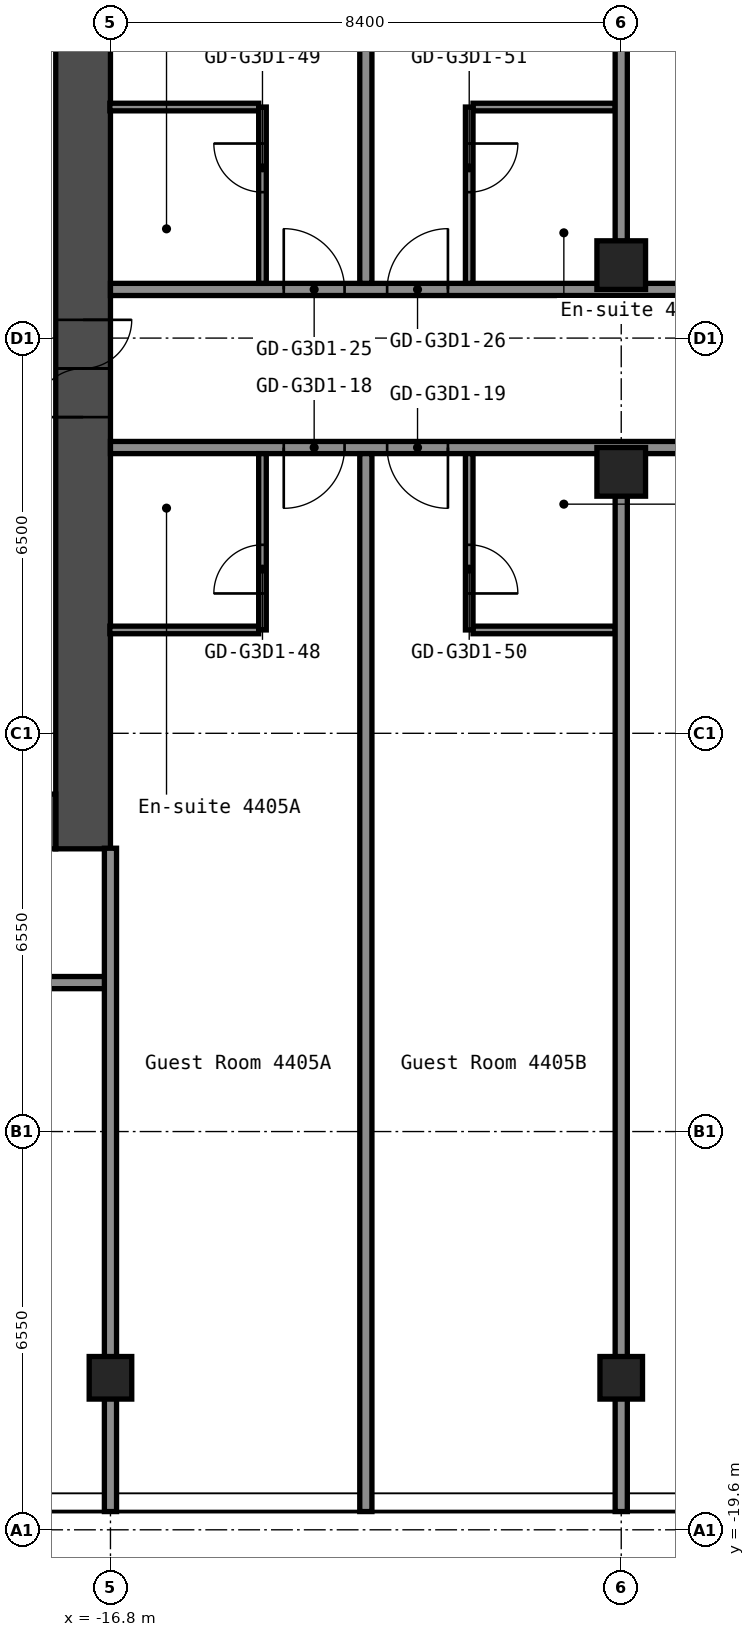
"""IFC4 building model, lengths in metres.
Left out: names, types, materials, properties, quantities, classifications, styles, units other than length and angle.
Written with IfcOpenShell. Run it as: python <this file> out.ifc"""

import sys

from ifc_helpers import new_model, si_unit, direction, frame, frame_2d, origin, origin_2d, place, context, subcontext, project, spatial, rectangle, hollow_rectangle, extrude, element, fill, save


model = new_model("IFC4")
c1 = context("Model", 3, precision=1e-05, world=origin(), true_north=direction((0.0, 1.0)))
c2 = subcontext(c1, "Body", "Model", "MODEL_VIEW")
j1 = project(units=[si_unit("LENGTHUNIT", "METRE"), si_unit("PLANEANGLEUNIT", "RADIAN")], contexts=[c1])
p1 = place(None, origin())
s1 = spatial("IfcSite", under=j1, at=p1, CompositionType="ELEMENT")
p2 = place(p1, origin())
s2 = spatial("IfcBuilding", under=s1, at=p2, CompositionType="ELEMENT")
p3 = place(p2, frame((0.0, 0.0, 156.6)))
s3 = spatial("IfcBuildingStorey", under=s2, at=p3, CompositionType="ELEMENT", Elevation=156.6)
for number, where, z_axis, x_axis in (
    (1, (-16.8, -17.1, 0.0), (0.0, 0.0, 1.0), (1.0, 0.0, 0.0)),
    (2, (-8.4, -17.1, 0.0), (0.0, 0.0, 1.0), (1.0, 0.0, 0.0)),
):
    element("IfcColumn", number, at=place(p3, frame(where, z_axis=z_axis, x_axis=x_axis)), inside=s3, PredefinedType="COLUMN", context=c2, shape_type="SweptSolid", body=[
        extrude(hollow_rectangle(XDim=0.7, YDim=0.7, WallThickness=0.028, at=origin_2d()), origin(), (0.0, 0.0, 1.0), 2.75),
    ])
for number, where, z_axis, x_axis in (
    (3, (-8.4, -2.2, 0.0), (0.0, 0.0, 1.0), (1.0, 0.0, 0.0)),
    (4, (-8.4, 1.2, 0.0), (0.0, 0.0, 1.0), (1.0, 0.0, 0.0)),
):
    element("IfcColumn", number, at=place(p3, frame(where, z_axis=z_axis, x_axis=x_axis)), inside=s3, PredefinedType="COLUMN", context=c2, shape_type="SweptSolid", body=[
        extrude(hollow_rectangle(XDim=0.8, YDim=0.8, WallThickness=0.032, at=origin_2d()), origin(), (0.0, 0.0, 1.0), 2.75),
    ])
p4 = place(p3, frame((-17.25, -8.4, 0.0), z_axis=(0.0, 0.0, 1.0), x_axis=(0.0, 1.0, 0.0)))
e5 = element("IfcWall", 5, at=p4, inside=s3, PredefinedType="SHEAR", context=c2, shape_type="SweptSolid", body=[
    extrude(rectangle(XDim=16.8, YDim=0.9, at=frame_2d((8.4, 0.0))), origin(), (0.0, 0.0, 1.0), 2.75),
])
p5 = place(p4, frame((7.1, 0.0, 0.0)))
e6 = element("IfcOpeningElement", 6, at=p5, cuts=e5, PredefinedType="OPENING", context=c2, shape_type="SweptSolid", body=[
    extrude(rectangle(XDim=1.6, YDim=2.1, at=frame_2d((0.8, 1.05))), frame((0.0, 0.46, 0.0), z_axis=(0.0, -1.0, 0.0), x_axis=(1.0, 0.0, 0.0)), (0.0, 0.0, 1.0), 0.92),
])
p6 = place(p3, frame((-32.7, -7.95, 0.0), z_axis=(0.0, 0.0, 1.0), x_axis=(1.0, 0.0, 0.0)))
e7 = element("IfcWall", 7, at=p6, inside=s3, PredefinedType="SHEAR", context=c2, shape_type="SweptSolid", body=[
    extrude(rectangle(XDim=15.0, YDim=0.9, at=frame_2d((7.5, 0.0))), origin(), (0.0, 0.0, 1.0), 2.75),
])
p7 = place(p6, frame((11.45, 0.0, 0.0)))
e8 = element("IfcOpeningElement", 8, at=p7, cuts=e7, PredefinedType="OPENING", context=c2, shape_type="SweptSolid", body=[
    extrude(rectangle(XDim=1.0, YDim=2.1, at=frame_2d((0.5, 1.05))), frame((0.0, 0.46, 0.0), z_axis=(0.0, -1.0, 0.0), x_axis=(1.0, 0.0, 0.0)), (0.0, 0.0, 1.0), 0.92),
])
p8 = place(p3, frame((-42.7, -10.6, 0.0), z_axis=(0.0, 0.0, 1.0), x_axis=(1.0, 0.0, 0.0)))
e9 = element("IfcWall", 9, at=p8, inside=s3, PredefinedType="PARTITIONING", context=c2, shape_type="SweptSolid", body=[
    extrude(rectangle(XDim=25.9, YDim=0.2, at=frame_2d((12.95, 0.0))), origin(), (0.0, 0.0, 1.0), 2.75),
])
p9 = place(p8, frame((2.5, 0.0, 0.0)))
e10 = element("IfcOpeningElement", 10, at=p9, cuts=e9, PredefinedType="OPENING", context=c2, shape_type="SweptSolid", body=[
    extrude(rectangle(XDim=1.0, YDim=2.1, at=frame_2d((0.5, 1.05))), frame((0.0, 0.11, 0.0), z_axis=(0.0, -1.0, 0.0), x_axis=(1.0, 0.0, 0.0)), (0.0, 0.0, 1.0), 0.22),
])
p10 = place(p8, frame((11.95, 0.0, 0.0)))
e11 = element("IfcOpeningElement", 11, at=p10, cuts=e9, PredefinedType="OPENING", context=c2, shape_type="SweptSolid", body=[
    extrude(rectangle(XDim=1.0, YDim=2.1, at=frame_2d((0.5, 1.05))), frame((0.0, 0.11, 0.0), z_axis=(0.0, -1.0, 0.0), x_axis=(1.0, 0.0, 0.0)), (0.0, 0.0, 1.0), 0.22),
])
p11 = place(p8, frame((13.65, 0.0, 0.0)))
e12 = element("IfcOpeningElement", 12, at=p11, cuts=e9, PredefinedType="OPENING", context=c2, shape_type="SweptSolid", body=[
    extrude(rectangle(XDim=1.0, YDim=2.1, at=frame_2d((0.5, 1.05))), frame((0.0, 0.11, 0.0), z_axis=(0.0, -1.0, 0.0), x_axis=(1.0, 0.0, 0.0)), (0.0, 0.0, 1.0), 0.22),
])
p12 = place(p8, frame((22.9, 0.0, 0.0)))
e13 = element("IfcOpeningElement", 13, at=p12, cuts=e9, PredefinedType="OPENING", context=c2, shape_type="SweptSolid", body=[
    extrude(rectangle(XDim=1.0, YDim=2.1, at=frame_2d((0.5, 1.05))), frame((0.0, 0.11, 0.0), z_axis=(0.0, -1.0, 0.0), x_axis=(1.0, 0.0, 0.0)), (0.0, 0.0, 1.0), 0.22),
])
p13 = place(p3, frame((-16.81, -4.8, 0.0), z_axis=(0.0, 0.0, 1.0), x_axis=(1.0, 0.0, 0.0)))
e14 = element("IfcWall", 14, at=p13, inside=s3, PredefinedType="PARTITIONING", context=c2, shape_type="SweptSolid", body=[
    extrude(rectangle(XDim=2.448, YDim=0.125, at=frame_2d((1.224, 0.0))), origin(), (0.0, 0.0, 1.0), 2.75),
])
p14 = place(p3, frame((-10.837, -4.8, 0.0), z_axis=(0.0, 0.0, 1.0), x_axis=(1.0, 0.0, 0.0)))
e15 = element("IfcWall", 15, at=p14, inside=s3, PredefinedType="PARTITIONING", context=c2, shape_type="SweptSolid", body=[
    extrude(rectangle(XDim=2.337, YDim=0.125, at=frame_2d((1.169, 0.0))), origin(), (0.0, 0.0, 1.0), 2.75),
])
p15 = place(p3, frame((-16.8, -1.8, 0.0), z_axis=(0.0, 0.0, 1.0), x_axis=(1.0, 0.0, 0.0)))
e16 = element("IfcWall", 16, at=p15, inside=s3, PredefinedType="PARTITIONING", context=c2, shape_type="SweptSolid", body=[
    extrude(rectangle(XDim=33.6, YDim=0.2, at=frame_2d((16.8, 0.0))), origin(), (0.0, 0.0, 1.0), 2.75),
])
p16 = place(p15, frame((2.85, 0.0, 0.0)))
e17 = element("IfcOpeningElement", 17, at=p16, cuts=e16, PredefinedType="OPENING", context=c2, shape_type="SweptSolid", body=[
    extrude(rectangle(XDim=1.0, YDim=2.1, at=frame_2d((0.5, 1.05))), frame((0.0, 0.11, 0.0), z_axis=(0.0, -1.0, 0.0), x_axis=(1.0, 0.0, 0.0)), (0.0, 0.0, 1.0), 0.22),
])
p17 = place(p15, frame((4.55, 0.0, 0.0)))
e18 = element("IfcOpeningElement", 18, at=p17, cuts=e16, PredefinedType="OPENING", context=c2, shape_type="SweptSolid", body=[
    extrude(rectangle(XDim=1.0, YDim=2.1, at=frame_2d((0.5, 1.05))), frame((0.0, 0.11, 0.0), z_axis=(0.0, -1.0, 0.0), x_axis=(1.0, 0.0, 0.0)), (0.0, 0.0, 1.0), 0.22),
])
p18 = place(p15, frame((10.385, 0.0, 0.0)))
e19 = element("IfcOpeningElement", 19, at=p18, cuts=e16, PredefinedType="OPENING", context=c2, shape_type="SweptSolid", body=[
    extrude(rectangle(XDim=0.9, YDim=2.1, at=frame_2d((0.45, 1.05))), frame((0.0, 0.11, 0.0), z_axis=(0.0, -1.0, 0.0), x_axis=(1.0, 0.0, 0.0)), (0.0, 0.0, 1.0), 0.22),
])
p19 = place(p15, frame((14.585, 0.0, 0.0)))
e20 = element("IfcOpeningElement", 20, at=p19, cuts=e16, PredefinedType="OPENING", context=c2, shape_type="SweptSolid", body=[
    extrude(rectangle(XDim=0.9, YDim=2.1, at=frame_2d((0.45, 1.05))), frame((0.0, 0.11, 0.0), z_axis=(0.0, -1.0, 0.0), x_axis=(1.0, 0.0, 0.0)), (0.0, 0.0, 1.0), 0.22),
])
p20 = place(p15, frame((19.65, 0.0, 0.0)))
e21 = element("IfcOpeningElement", 21, at=p20, cuts=e16, PredefinedType="OPENING", context=c2, shape_type="SweptSolid", body=[
    extrude(rectangle(XDim=1.0, YDim=2.1, at=frame_2d((0.5, 1.05))), frame((0.0, 0.11, 0.0), z_axis=(0.0, -1.0, 0.0), x_axis=(1.0, 0.0, 0.0)), (0.0, 0.0, 1.0), 0.22),
])
p21 = place(p15, frame((21.35, 0.0, 0.0)))
e22 = element("IfcOpeningElement", 22, at=p21, cuts=e16, PredefinedType="OPENING", context=c2, shape_type="SweptSolid", body=[
    extrude(rectangle(XDim=1.0, YDim=2.1, at=frame_2d((0.5, 1.05))), frame((0.0, 0.11, 0.0), z_axis=(0.0, -1.0, 0.0), x_axis=(1.0, 0.0, 0.0)), (0.0, 0.0, 1.0), 0.22),
])
p22 = place(p15, frame((30.6, 0.0, 0.0)))
e23 = element("IfcOpeningElement", 23, at=p22, cuts=e16, PredefinedType="OPENING", context=c2, shape_type="SweptSolid", body=[
    extrude(rectangle(XDim=1.0, YDim=2.1, at=frame_2d((0.5, 1.05))), frame((0.0, 0.11, 0.0), z_axis=(0.0, -1.0, 0.0), x_axis=(1.0, 0.0, 0.0)), (0.0, 0.0, 1.0), 0.22),
])
p23 = place(p3, frame((-16.8, 0.8, 0.0), z_axis=(0.0, 0.0, 1.0), x_axis=(1.0, 0.0, 0.0)))
e24 = element("IfcWall", 24, at=p23, inside=s3, PredefinedType="PARTITIONING", context=c2, shape_type="SweptSolid", body=[
    extrude(rectangle(XDim=33.6, YDim=0.2, at=frame_2d((16.8, 0.0))), origin(), (0.0, 0.0, 1.0), 2.75),
])
p24 = place(p23, frame((2.85, 0.0, 0.0)))
e25 = element("IfcOpeningElement", 25, at=p24, cuts=e24, PredefinedType="OPENING", context=c2, shape_type="SweptSolid", body=[
    extrude(rectangle(XDim=1.0, YDim=2.1, at=frame_2d((0.5, 1.05))), frame((0.0, 0.11, 0.0), z_axis=(0.0, -1.0, 0.0), x_axis=(1.0, 0.0, 0.0)), (0.0, 0.0, 1.0), 0.22),
])
p25 = place(p23, frame((4.55, 0.0, 0.0)))
e26 = element("IfcOpeningElement", 26, at=p25, cuts=e24, PredefinedType="OPENING", context=c2, shape_type="SweptSolid", body=[
    extrude(rectangle(XDim=1.0, YDim=2.1, at=frame_2d((0.5, 1.05))), frame((0.0, 0.11, 0.0), z_axis=(0.0, -1.0, 0.0), x_axis=(1.0, 0.0, 0.0)), (0.0, 0.0, 1.0), 0.22),
])
p26 = place(p23, frame((10.4, 0.0, 0.0)))
e27 = element("IfcOpeningElement", 27, at=p26, cuts=e24, PredefinedType="OPENING", context=c2, shape_type="SweptSolid", body=[
    extrude(rectangle(XDim=1.0, YDim=2.1, at=frame_2d((0.5, 1.05))), frame((0.0, 0.11, 0.0), z_axis=(0.0, -1.0, 0.0), x_axis=(1.0, 0.0, 0.0)), (0.0, 0.0, 1.0), 0.22),
])
p27 = place(p23, frame((19.65, 0.0, 0.0)))
e28 = element("IfcOpeningElement", 28, at=p27, cuts=e24, PredefinedType="OPENING", context=c2, shape_type="SweptSolid", body=[
    extrude(rectangle(XDim=1.0, YDim=2.1, at=frame_2d((0.5, 1.05))), frame((0.0, 0.11, 0.0), z_axis=(0.0, -1.0, 0.0), x_axis=(1.0, 0.0, 0.0)), (0.0, 0.0, 1.0), 0.22),
])
p28 = place(p23, frame((21.35, 0.0, 0.0)))
e29 = element("IfcOpeningElement", 29, at=p28, cuts=e24, PredefinedType="OPENING", context=c2, shape_type="SweptSolid", body=[
    extrude(rectangle(XDim=1.0, YDim=2.1, at=frame_2d((0.5, 1.05))), frame((0.0, 0.11, 0.0), z_axis=(0.0, -1.0, 0.0), x_axis=(1.0, 0.0, 0.0)), (0.0, 0.0, 1.0), 0.22),
])
p29 = place(p23, frame((30.6, 0.0, 0.0)))
e30 = element("IfcOpeningElement", 30, at=p29, cuts=e24, PredefinedType="OPENING", context=c2, shape_type="SweptSolid", body=[
    extrude(rectangle(XDim=1.0, YDim=2.1, at=frame_2d((0.5, 1.05))), frame((0.0, 0.11, 0.0), z_axis=(0.0, -1.0, 0.0), x_axis=(1.0, 0.0, 0.0)), (0.0, 0.0, 1.0), 0.22),
])
p30 = place(p3, frame((-16.81, 3.8, 0.0), z_axis=(0.0, 0.0, 1.0), x_axis=(1.0, 0.0, 0.0)))
e31 = element("IfcWall", 31, at=p30, inside=s3, PredefinedType="PARTITIONING", context=c2, shape_type="SweptSolid", body=[
    extrude(rectangle(XDim=2.448, YDim=0.125, at=frame_2d((1.224, 0.0))), origin(), (0.0, 0.0, 1.0), 2.75),
])
p31 = place(p3, frame((-10.837, 3.8, 0.0), z_axis=(0.0, 0.0, 1.0), x_axis=(1.0, 0.0, 0.0)))
e32 = element("IfcWall", 32, at=p31, inside=s3, PredefinedType="PARTITIONING", context=c2, shape_type="SweptSolid", body=[
    extrude(rectangle(XDim=2.337, YDim=0.125, at=frame_2d((1.169, 0.0))), origin(), (0.0, 0.0, 1.0), 2.75),
])
p32 = place(p3, frame((-16.8, -19.3, 0.0), z_axis=(0.0, 0.0, 1.0), x_axis=(0.0, 1.0, 0.0)))
e33 = element("IfcWall", 33, at=p32, inside=s3, PredefinedType="PARTITIONING", context=c2, shape_type="SweptSolid", body=[
    extrude(rectangle(XDim=10.91, YDim=0.2, at=frame_2d((5.455, 0.0))), origin(), (0.0, 0.0, 1.0), 2.75),
])
p33 = place(p3, frame((-14.3, -4.8, 0.0), z_axis=(0.0, 0.0, 1.0), x_axis=(0.0, 1.0, 0.0)))
e34 = element("IfcWall", 34, at=p33, inside=s3, PredefinedType="PARTITIONING", context=c2, shape_type="SweptSolid", body=[
    extrude(rectangle(XDim=2.9, YDim=0.125, at=frame_2d((1.45, 0.0))), origin(), (0.0, 0.0, 1.0), 2.75),
])
p34 = place(p33, frame((0.6, 0.0, 0.0)))
e35 = element("IfcOpeningElement", 35, at=p34, cuts=e34, PredefinedType="OPENING", context=c2, shape_type="SweptSolid", body=[
    extrude(rectangle(XDim=0.8, YDim=2.1, at=frame_2d((0.4, 1.05))), frame((0.0, 0.073, 0.0), z_axis=(0.0, -1.0, 0.0), x_axis=(1.0, 0.0, 0.0)), (0.0, 0.0, 1.0), 0.145),
])
p35 = place(p3, frame((-14.3, 0.9, 0.0), z_axis=(0.0, 0.0, 1.0), x_axis=(0.0, 1.0, 0.0)))
e36 = element("IfcWall", 36, at=p35, inside=s3, PredefinedType="PARTITIONING", context=c2, shape_type="SweptSolid", body=[
    extrude(rectangle(XDim=2.9, YDim=0.125, at=frame_2d((1.45, 0.0))), origin(), (0.0, 0.0, 1.0), 2.75),
])
p36 = place(p35, frame((1.5, 0.0, 0.0)))
e37 = element("IfcOpeningElement", 37, at=p36, cuts=e36, PredefinedType="OPENING", context=c2, shape_type="SweptSolid", body=[
    extrude(rectangle(XDim=0.8, YDim=2.1, at=frame_2d((0.4, 1.05))), frame((0.0, 0.073, 0.0), z_axis=(0.0, -1.0, 0.0), x_axis=(1.0, 0.0, 0.0)), (0.0, 0.0, 1.0), 0.145),
])
for number, where, z_axis, x_axis in (
    (38, (-12.6, -19.3, 0.0), (0.0, 0.0, 1.0), (0.0, 1.0, 0.0)),
    (39, (-12.6, 0.9, 0.0), (0.0, 0.0, 1.0), (0.0, 1.0, 0.0)),
):
    element("IfcWall", number, at=place(p3, frame(where, z_axis=z_axis, x_axis=x_axis)), inside=s3, PredefinedType="PARTITIONING", context=c2, shape_type="SweptSolid", body=[
        extrude(rectangle(XDim=17.4, YDim=0.2, at=frame_2d((8.7, 0.0))), origin(), (0.0, 0.0, 1.0), 2.75),
    ])
p37 = place(p3, frame((-10.9, -4.8, 0.0), z_axis=(0.0, 0.0, 1.0), x_axis=(0.0, 1.0, 0.0)))
e40 = element("IfcWall", 40, at=p37, inside=s3, PredefinedType="PARTITIONING", context=c2, shape_type="SweptSolid", body=[
    extrude(rectangle(XDim=2.9, YDim=0.125, at=frame_2d((1.45, 0.0))), origin(), (0.0, 0.0, 1.0), 2.75),
])
p38 = place(p37, frame((0.6, 0.0, 0.0)))
e41 = element("IfcOpeningElement", 41, at=p38, cuts=e40, PredefinedType="OPENING", context=c2, shape_type="SweptSolid", body=[
    extrude(rectangle(XDim=0.8, YDim=2.1, at=frame_2d((0.4, 1.05))), frame((0.0, 0.073, 0.0), z_axis=(0.0, -1.0, 0.0), x_axis=(1.0, 0.0, 0.0)), (0.0, 0.0, 1.0), 0.145),
])
p39 = place(p3, frame((-10.9, 0.9, 0.0), z_axis=(0.0, 0.0, 1.0), x_axis=(0.0, 1.0, 0.0)))
e42 = element("IfcWall", 42, at=p39, inside=s3, PredefinedType="PARTITIONING", context=c2, shape_type="SweptSolid", body=[
    extrude(rectangle(XDim=2.9, YDim=0.125, at=frame_2d((1.45, 0.0))), origin(), (0.0, 0.0, 1.0), 2.75),
])
p40 = place(p39, frame((1.5, 0.0, 0.0)))
e43 = element("IfcOpeningElement", 43, at=p40, cuts=e42, PredefinedType="OPENING", context=c2, shape_type="SweptSolid", body=[
    extrude(rectangle(XDim=0.8, YDim=2.1, at=frame_2d((0.4, 1.05))), frame((0.0, 0.073, 0.0), z_axis=(0.0, -1.0, 0.0), x_axis=(1.0, 0.0, 0.0)), (0.0, 0.0, 1.0), 0.145),
])
for number, where, z_axis, x_axis in (
    (44, (-8.4, -19.3, 0.0), (0.0, 0.0, 1.0), (0.0, 1.0, 0.0)),
    (45, (-8.4, 1.59, 0.0), (0.0, 0.0, 1.0), (0.0, 1.0, 0.0)),
):
    element("IfcWall", number, at=place(p3, frame(where, z_axis=z_axis, x_axis=x_axis)), inside=s3, PredefinedType="PARTITIONING", context=c2, shape_type="SweptSolid", body=[
        extrude(rectangle(XDim=16.71, YDim=0.2, at=frame_2d((8.355, 0.0))), origin(), (0.0, 0.0, 1.0), 2.75),
    ])
p41 = place(p5, origin())
e46 = element("IfcDoor", 46, at=p41, inside=s3, OperationType="DOUBLE_DOOR_SINGLE_SWING", PredefinedType="DOOR", context=c2, shape_type="SweptSolid", body=[
    extrude(rectangle(XDim=1.6, YDim=2.1, at=frame_2d((0.8, 1.05))), frame((0.0, 0.025, 0.0), z_axis=(0.0, -1.0, 0.0), x_axis=(1.0, 0.0, 0.0)), (0.0, 0.0, 1.0), 0.05),
])
fill(e6, e46)
p42 = place(p16, origin())
e47 = element("IfcDoor", 47, at=p42, inside=s3, OperationType="SINGLE_SWING_LEFT", PredefinedType="DOOR", context=c2, shape_type="SweptSolid", body=[
    extrude(rectangle(XDim=1.0, YDim=2.1, at=frame_2d((0.5, 1.05))), frame((0.0, 0.025, 0.0), z_axis=(0.0, -1.0, 0.0), x_axis=(1.0, 0.0, 0.0)), (0.0, 0.0, 1.0), 0.05),
])
fill(e17, e47)
p43 = place(p17, origin())
e48 = element("IfcDoor", 48, at=p43, inside=s3, OperationType="SINGLE_SWING_RIGHT", PredefinedType="DOOR", context=c2, shape_type="SweptSolid", body=[
    extrude(rectangle(XDim=1.0, YDim=2.1, at=frame_2d((0.5, 1.05))), frame((0.0, 0.025, 0.0), z_axis=(0.0, -1.0, 0.0), x_axis=(1.0, 0.0, 0.0)), (0.0, 0.0, 1.0), 0.05),
])
fill(e18, e48)
p44 = place(p24, origin())
e49 = element("IfcDoor", 49, at=p44, inside=s3, OperationType="SINGLE_SWING_RIGHT", PredefinedType="DOOR", context=c2, shape_type="SweptSolid", body=[
    extrude(rectangle(XDim=1.0, YDim=2.1, at=frame_2d((0.5, 1.05))), frame((0.0, 0.025, 0.0), z_axis=(0.0, -1.0, 0.0), x_axis=(1.0, 0.0, 0.0)), (0.0, 0.0, 1.0), 0.05),
])
fill(e25, e49)
p45 = place(p25, origin())
e50 = element("IfcDoor", 50, at=p45, inside=s3, OperationType="SINGLE_SWING_LEFT", PredefinedType="DOOR", context=c2, shape_type="SweptSolid", body=[
    extrude(rectangle(XDim=1.0, YDim=2.1, at=frame_2d((0.5, 1.05))), frame((0.0, 0.025, 0.0), z_axis=(0.0, -1.0, 0.0), x_axis=(1.0, 0.0, 0.0)), (0.0, 0.0, 1.0), 0.05),
])
fill(e26, e50)
p46 = place(p34, origin())
e51 = element("IfcDoor", 51, at=p46, inside=s3, OperationType="SINGLE_SWING_RIGHT", PredefinedType="DOOR", context=c2, shape_type="SweptSolid", body=[
    extrude(rectangle(XDim=0.8, YDim=2.1, at=frame_2d((0.4, 1.05))), frame((0.0, 0.025, 0.0), z_axis=(0.0, -1.0, 0.0), x_axis=(1.0, 0.0, 0.0)), (0.0, 0.0, 1.0), 0.05),
])
fill(e35, e51)
p47 = place(p36, origin())
e52 = element("IfcDoor", 52, at=p47, inside=s3, OperationType="SINGLE_SWING_LEFT", PredefinedType="DOOR", context=c2, shape_type="SweptSolid", body=[
    extrude(rectangle(XDim=0.8, YDim=2.1, at=frame_2d((0.4, 1.05))), frame((0.0, 0.025, 0.0), z_axis=(0.0, -1.0, 0.0), x_axis=(1.0, 0.0, 0.0)), (0.0, 0.0, 1.0), 0.05),
])
fill(e37, e52)
p48 = place(p38, origin())
e53 = element("IfcDoor", 53, at=p48, inside=s3, OperationType="SINGLE_SWING_LEFT", PredefinedType="DOOR", context=c2, shape_type="SweptSolid", body=[
    extrude(rectangle(XDim=0.8, YDim=2.1, at=frame_2d((0.4, 1.05))), frame((0.0, 0.025, 0.0), z_axis=(0.0, -1.0, 0.0), x_axis=(1.0, 0.0, 0.0)), (0.0, 0.0, 1.0), 0.05),
])
fill(e41, e53)
p49 = place(p40, origin())
e54 = element("IfcDoor", 54, at=p49, inside=s3, OperationType="SINGLE_SWING_RIGHT", PredefinedType="DOOR", context=c2, shape_type="SweptSolid", body=[
    extrude(rectangle(XDim=0.8, YDim=2.1, at=frame_2d((0.4, 1.05))), frame((0.0, 0.025, 0.0), z_axis=(0.0, -1.0, 0.0), x_axis=(1.0, 0.0, 0.0)), (0.0, 0.0, 1.0), 0.05),
])
fill(e43, e54)
save(model, sys.argv[1])
